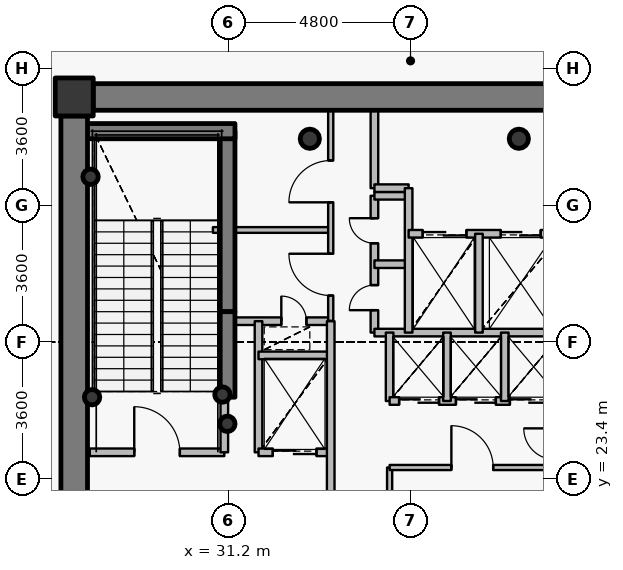
"""IFC4 building model, lengths in metres.
Left out: names, types, materials, properties, quantities, classifications, styles, units other than length and angle.
Written with IfcOpenShell. Run it as: python <this file> out.ifc"""

import sys

from ifc_helpers import new_model, si_unit, direction, frame, frame_2d, origin, origin_2d, place, context, subcontext, project, spatial, rectangle, hollow_circle, extrude, source, transform, mapped, element, fill, save


model = new_model("IFC4")
c1 = context("Model", 3, precision=1e-05, world=origin(), true_north=direction((0.0, 1.0)))
c2 = subcontext(c1, "Body", "Model", "MODEL_VIEW")
j1 = project(units=[si_unit("LENGTHUNIT", "METRE"), si_unit("PLANEANGLEUNIT", "RADIAN")], contexts=[c1])
p1 = place(None, origin())
s1 = spatial("IfcSite", under=j1, at=p1, CompositionType="ELEMENT")
p2 = place(p1, origin())
s2 = spatial("IfcBuilding", under=s1, at=p2, CompositionType="ELEMENT")
p3 = place(p2, frame((0.0, 0.0, 268.2)))
s3 = spatial("IfcBuildingStorey", under=s2, at=p3, CompositionType="ELEMENT", Elevation=268.2)
p4 = place(p3, frame((27.15, 33.45, 0.0), z_axis=(0.0, 0.0, 1.0), x_axis=(1.0, 0.0, 0.0)))
e1 = element("IfcColumn", 1, at=p4, inside=s3, PredefinedType="COLUMN", context=c2, shape_type="SweptSolid", body=[
    extrude(rectangle(XDim=1.0, YDim=1.0, at=origin_2d()), origin(), (0.0, 0.0, 1.0), 4.8),
])
for number, where, z_axis, x_axis in (
    (2, (38.85, 32.35, 0.0), (0.0, 0.0, 1.0), (1.0, 0.0, 0.0)),
    (3, (33.35, 32.35, 0.0), (0.0, 0.0, 1.0), (1.0, 0.0, 0.0)),
):
    element("IfcColumn", number, at=place(p3, frame(where, z_axis=z_axis, x_axis=x_axis)), inside=s3, PredefinedType="COLUMN", context=c2, shape_type="SweptSolid", body=[
        extrude(hollow_circle(Radius=0.254, WallThickness=0.02, at=origin_2d()), origin(), (0.0, 0.0, 1.0), 4.8),
    ])
p5 = place(p3, frame((31.18, 27.8, 0.0), z_axis=(0.0, 0.0, 1.0), x_axis=(0.0, 1.0, 0.0)))
e4 = element("IfcWall", 4, at=p5, inside=s3, PredefinedType="SHEAR", context=c2, shape_type="SweptSolid", body=[
    extrude(rectangle(XDim=4.75, YDim=0.4, at=frame_2d((2.375, 0.0))), origin(), (0.0, 0.0, 1.0), 4.8),
])
p6 = place(p3, frame((27.25, 32.55, 0.0), z_axis=(0.0, 0.0, 1.0), x_axis=(1.0, 0.0, 0.0)))
e5 = element("IfcWall", 5, at=p6, inside=s3, PredefinedType="SHEAR", context=c2, shape_type="SweptSolid", body=[
    extrude(rectangle(XDim=4.13, YDim=0.4, at=frame_2d((2.065, 0.0))), origin(), (0.0, 0.0, 1.0), 4.8),
])
for number, where, z_axis, x_axis in (
    (6, (27.58, 31.35, 0.0), (0.0, 0.0, 1.0), (1.0, 0.0, 0.0)),
    (7, (31.05, 25.62, 0.0), (0.0, 0.0, 1.0), (1.0, 0.0, 0.0)),
    (8, (31.18, 24.85, 0.0), (0.0, 0.0, 1.0), (1.0, 0.0, 0.0)),
    (9, (27.62, 25.55, 0.0), (0.0, 0.0, 1.0), (1.0, 0.0, 0.0)),
):
    element("IfcColumn", number, at=place(p3, frame(where, z_axis=z_axis, x_axis=x_axis)), inside=s3, PredefinedType="COLUMN", context=c2, shape_type="SweptSolid", body=[
        extrude(hollow_circle(Radius=0.203, WallThickness=0.016, at=origin_2d()), origin(), (0.0, 0.0, 1.0), 4.8),
    ])
p7 = place(p3, frame((27.65, 33.45, 0.0), z_axis=(0.0, 0.0, 1.0), x_axis=(1.0, 0.0, 0.0)))
e10 = element("IfcWall", 10, at=p7, inside=s3, PredefinedType="SHEAR", context=c2, shape_type="SweptSolid", body=[
    extrude(rectangle(XDim=16.7, YDim=0.7, at=frame_2d((8.35, 0.0))), origin(), (0.0, 0.0, 1.0), 4.1),
])
p8 = place(p7, frame((12.775, 0.0, 0.0)))
e11 = element("IfcOpeningElement", 11, at=p8, cuts=e10, PredefinedType="OPENING", context=c2, shape_type="SweptSolid", body=[
    extrude(rectangle(XDim=1.15, YDim=2.15, at=origin_2d()), frame((0.575, 0.36, 1.075), z_axis=(0.0, -1.0, 0.0), x_axis=(1.0, 0.0, 0.0)), (0.0, 0.0, 1.0), 0.72),
])
p9 = place(p3, frame((27.15, 21.05, 0.0), z_axis=(0.0, 0.0, 1.0), x_axis=(0.0, 1.0, 0.0)))
e12 = element("IfcWall", 12, at=p9, inside=s3, PredefinedType="SHEAR", context=c2, shape_type="SweptSolid", body=[
    extrude(rectangle(XDim=11.9, YDim=0.7, at=frame_2d((5.95, 0.0))), origin(), (0.0, 0.0, 1.0), 4.1),
])
p10 = place(p3, frame((31.18, 25.55, 0.0), z_axis=(0.0, 0.0, 1.0), x_axis=(0.0, 1.0, 0.0)))
e13 = element("IfcWall", 13, at=p10, inside=s3, PredefinedType="SHEAR", context=c2, shape_type="SweptSolid", body=[
    extrude(rectangle(XDim=2.25, YDim=0.4, at=frame_2d((1.125, 0.0))), origin(), (0.0, 0.0, 1.0), 4.15),
])
p11 = place(p3, frame((27.56, 24.1, 0.0), z_axis=(0.0, 0.0, 1.0), x_axis=(1.0, 0.0, 0.0)))
e14 = element("IfcWall", 14, at=p11, inside=s3, PredefinedType="PARTITIONING", context=c2, shape_type="SweptSolid", body=[
    extrude(rectangle(XDim=3.54, YDim=0.2, at=frame_2d((1.77, 0.0))), origin(), (0.0, 0.0, 1.0), 4.55),
])
p12 = place(p11, frame((1.17, 0.0, 0.0)))
e15 = element("IfcOpeningElement", 15, at=p12, cuts=e14, PredefinedType="OPENING", context=c2, shape_type="SweptSolid", body=[
    extrude(rectangle(XDim=1.2, YDim=2.15, at=origin_2d()), frame((0.6, 0.11, 1.075), z_axis=(0.0, -1.0, 0.0), x_axis=(1.0, 0.0, 0.0)), (0.0, 0.0, 1.0), 0.22),
])
p13 = place(p3, frame((30.8, 29.95, 0.0), z_axis=(0.0, 0.0, 1.0), x_axis=(1.0, 0.0, 0.0)))
e16 = element("IfcWall", 16, at=p13, inside=s3, PredefinedType="PARTITIONING", context=c2, shape_type="SweptSolid", body=[
    extrude(rectangle(XDim=3.1, YDim=0.15, at=frame_2d((1.55, 0.0))), origin(), (0.0, 0.0, 1.0), 4.135),
])
p14 = place(p3, frame((31.1, 24.1, 0.0), z_axis=(0.0, 0.0, 1.0), x_axis=(0.0, 1.0, 0.0)))
e17 = element("IfcWall", 17, at=p14, inside=s3, PredefinedType="PARTITIONING", context=c2, shape_type="SweptSolid", body=[
    extrude(rectangle(XDim=1.44, YDim=0.2, at=frame_2d((0.72, 0.0))), origin(), (0.0, 0.0, 1.0), 4.55),
])
p15 = place(p3, frame((31.1, 27.55, 0.0), z_axis=(0.0, 0.0, 1.0), x_axis=(1.0, 0.0, 0.0)))
e18 = element("IfcWall", 18, at=p15, inside=s3, PredefinedType="PARTITIONING", context=c2, shape_type="SweptSolid", body=[
    extrude(rectangle(XDim=2.8, YDim=0.2, at=frame_2d((1.4, 0.0))), origin(), (0.0, 0.0, 1.0), 4.135),
])
p16 = place(p15, frame((1.5, 0.0, 0.0)))
e19 = element("IfcOpeningElement", 19, at=p16, cuts=e18, PredefinedType="OPENING", context=c2, shape_type="SweptSolid", body=[
    extrude(rectangle(XDim=0.66, YDim=2.05, at=origin_2d()), frame((0.33, 0.11, 1.025), z_axis=(0.0, -1.0, 0.0), x_axis=(1.0, 0.0, 0.0)), (0.0, 0.0, 1.0), 0.22),
])
p17 = place(p3, frame((32.0, 24.1, 0.0), z_axis=(0.0, 0.0, 1.0), x_axis=(0.0, 1.0, 0.0)))
e20 = element("IfcWall", 20, at=p17, inside=s3, PredefinedType="PARTITIONING", context=c2, shape_type="SweptSolid", body=[
    extrude(rectangle(XDim=3.45, YDim=0.2, at=frame_2d((1.725, 0.0))), origin(), (0.0, 0.0, 1.0), 4.55),
])
p18 = place(p3, frame((32.0, 24.1, 0.0), z_axis=(0.0, 0.0, 1.0), x_axis=(1.0, 0.0, 0.0)))
e21 = element("IfcWall", 21, at=p18, inside=s3, PredefinedType="PARTITIONING", context=c2, shape_type="SweptSolid", body=[
    extrude(rectangle(XDim=1.9, YDim=0.2, at=frame_2d((0.95, 0.0))), origin(), (0.0, 0.0, 1.0), 4.135),
])
p19 = place(p18, frame((0.375, 0.0, 0.0)))
e22 = element("IfcOpeningElement", 22, at=p19, cuts=e21, PredefinedType="OPENING", context=c2, shape_type="SweptSolid", body=[
    extrude(rectangle(XDim=1.15, YDim=2.15, at=origin_2d()), frame((0.575, 0.11, 1.075), z_axis=(0.0, -1.0, 0.0), x_axis=(1.0, 0.0, 0.0)), (0.0, 0.0, 1.0), 0.22),
])
p20 = place(p3, frame((32.0, 26.65, 0.0), z_axis=(0.0, 0.0, 1.0), x_axis=(1.0, 0.0, 0.0)))
e23 = element("IfcWall", 23, at=p20, inside=s3, PredefinedType="PARTITIONING", context=c2, shape_type="SweptSolid", body=[
    extrude(rectangle(XDim=1.9, YDim=0.2, at=frame_2d((0.95, 0.0))), origin(), (0.0, 0.0, 1.0), 4.135),
])
p21 = place(p3, frame((33.9, 20.9, 0.0), z_axis=(0.0, 0.0, 1.0), x_axis=(0.0, 1.0, 0.0)))
e24 = element("IfcWall", 24, at=p21, inside=s3, PredefinedType="PARTITIONING", context=c2, shape_type="SweptSolid", body=[
    extrude(rectangle(XDim=6.65, YDim=0.2, at=frame_2d((3.325, 0.0))), origin(), (0.0, 0.0, 1.0), 4.135),
])
p22 = place(p3, frame((33.9, 27.56, 0.0), z_axis=(0.0, 0.0, 1.0), x_axis=(0.0, 1.0, 0.0)))
e25 = element("IfcWall", 25, at=p22, inside=s3, PredefinedType="PARTITIONING", context=c2, shape_type="SweptSolid", body=[
    extrude(rectangle(XDim=5.54, YDim=0.135, at=frame_2d((2.77, 0.0))), origin(), (0.0, 0.0, 1.0), 4.135),
])
p23 = place(p22, frame((0.665, 0.0, 0.0)))
e26 = element("IfcOpeningElement", 26, at=p23, cuts=e25, PredefinedType="OPENING", context=c2, shape_type="SweptSolid", body=[
    extrude(rectangle(XDim=1.1, YDim=2.15, at=origin_2d()), frame((0.55, 0.078, 1.075), z_axis=(0.0, -1.0, 0.0), x_axis=(1.0, 0.0, 0.0)), (0.0, 0.0, 1.0), 0.155),
])
p24 = place(p22, frame((3.117, 0.0, 0.0)))
e27 = element("IfcOpeningElement", 27, at=p24, cuts=e25, PredefinedType="OPENING", context=c2, shape_type="SweptSolid", body=[
    extrude(rectangle(XDim=1.1, YDim=2.15, at=origin_2d()), frame((0.55, 0.078, 1.075), z_axis=(0.0, -1.0, 0.0), x_axis=(1.0, 0.0, 0.0)), (0.0, 0.0, 1.0), 0.155),
])
p25 = place(p3, frame((35.05, 27.25, 0.0), z_axis=(0.0, 0.0, 1.0), x_axis=(0.0, 1.0, 0.0)))
e28 = element("IfcWall", 28, at=p25, inside=s3, PredefinedType="PARTITIONING", context=c2, shape_type="SweptSolid", body=[
    extrude(rectangle(XDim=3.6, YDim=0.2, at=frame_2d((1.8, 0.0))), origin(), (0.0, 0.0, 1.0), 4.55),
])
p26 = place(p25, frame((0.59, 0.0, 0.0)))
e29 = element("IfcOpeningElement", 29, at=p26, cuts=e28, PredefinedType="OPENING", context=c2, shape_type="SweptSolid", body=[
    extrude(rectangle(XDim=0.66, YDim=2.05, at=origin_2d()), frame((0.33, 0.11, 1.025), z_axis=(0.0, -1.0, 0.0), x_axis=(1.0, 0.0, 0.0)), (0.0, 0.0, 1.0), 0.22),
])
p27 = place(p25, frame((2.35, 0.0, 0.0)))
e30 = element("IfcOpeningElement", 30, at=p27, cuts=e28, PredefinedType="OPENING", context=c2, shape_type="SweptSolid", body=[
    extrude(rectangle(XDim=0.66, YDim=2.05, at=origin_2d()), frame((0.33, 0.11, 1.025), z_axis=(0.0, -1.0, 0.0), x_axis=(1.0, 0.0, 0.0)), (0.0, 0.0, 1.0), 0.22),
])
p28 = place(p3, frame((35.05, 27.25, 0.0), z_axis=(0.0, 0.0, 1.0), x_axis=(1.0, 0.0, 0.0)))
e31 = element("IfcWall", 31, at=p28, inside=s3, PredefinedType="PARTITIONING", context=c2, shape_type="SweptSolid", body=[
    extrude(rectangle(XDim=4.95, YDim=0.2, at=frame_2d((2.475, 0.0))), origin(), (0.0, 0.0, 1.0), 4.135),
])
for number, where, z_axis, x_axis in (
    (32, (35.05, 29.05, 0.0), (0.0, 0.0, 1.0), (1.0, 0.0, 0.0)),
    (33, (35.05, 30.85, 0.0), (0.0, 0.0, 1.0), (1.0, 0.0, 0.0)),
):
    element("IfcWall", number, at=place(p3, frame(where, z_axis=z_axis, x_axis=x_axis)), inside=s3, PredefinedType="PARTITIONING", context=c2, shape_type="SweptSolid", body=[
        extrude(rectangle(XDim=0.9, YDim=0.2, at=frame_2d((0.45, 0.0))), origin(), (0.0, 0.0, 1.0), 4.55),
    ])
p29 = place(p3, frame((35.05, 31.05, 0.0), z_axis=(0.0, 0.0, 1.0), x_axis=(0.0, 1.0, 0.0)))
e34 = element("IfcWall", 34, at=p29, inside=s3, PredefinedType="PARTITIONING", context=c2, shape_type="SweptSolid", body=[
    extrude(rectangle(XDim=2.05, YDim=0.2, at=frame_2d((1.025, 0.0))), origin(), (0.0, 0.0, 1.0), 4.135),
])
p30 = place(p3, frame((35.05, 31.05, 0.0), z_axis=(0.0, 0.0, 1.0), x_axis=(1.0, 0.0, 0.0)))
e35 = element("IfcWall", 35, at=p30, inside=s3, PredefinedType="PARTITIONING", context=c2, shape_type="SweptSolid", body=[
    extrude(rectangle(XDim=0.9, YDim=0.2, at=frame_2d((0.45, 0.0))), origin(), (0.0, 0.0, 1.0), 4.55),
])
p31 = place(p3, frame((35.45, 20.9, 0.0), z_axis=(0.0, 0.0, 1.0), x_axis=(0.0, 1.0, 0.0)))
e36 = element("IfcWall", 36, at=p31, inside=s3, PredefinedType="PARTITIONING", context=c2, shape_type="SweptSolid", body=[
    extrude(rectangle(XDim=2.8, YDim=0.135, at=frame_2d((1.4, 0.0))), origin(), (0.0, 0.0, 1.0), 4.135),
])
p32 = place(p3, frame((35.45, 23.7, 0.0), z_axis=(0.0, 0.0, 1.0), x_axis=(1.0, 0.0, 0.0)))
e37 = element("IfcWall", 37, at=p32, inside=s3, PredefinedType="PARTITIONING", context=c2, shape_type="SweptSolid", body=[
    extrude(rectangle(XDim=4.35, YDim=0.135, at=frame_2d((2.175, 0.0))), origin(), (0.0, 0.0, 1.0), 4.135),
])
p33 = place(p32, frame((1.625, 0.0, 0.0)))
e38 = element("IfcOpeningElement", 38, at=p33, cuts=e37, PredefinedType="OPENING", context=c2, shape_type="SweptSolid", body=[
    extrude(rectangle(XDim=1.1, YDim=2.15, at=origin_2d()), frame((0.55, 0.078, 1.075), z_axis=(0.0, -1.0, 0.0), x_axis=(1.0, 0.0, 0.0)), (0.0, 0.0, 1.0), 0.155),
])
p34 = place(p3, frame((35.45, 25.45, 0.0), z_axis=(0.0, 0.0, 1.0), x_axis=(0.0, 1.0, 0.0)))
e39 = element("IfcWall", 39, at=p34, inside=s3, PredefinedType="PARTITIONING", context=c2, shape_type="SweptSolid", body=[
    extrude(rectangle(XDim=1.8, YDim=0.2, at=frame_2d((0.9, 0.0))), origin(), (0.0, 0.0, 1.0), 4.55),
])
p35 = place(p3, frame((35.45, 25.45, 0.0), z_axis=(0.0, 0.0, 1.0), x_axis=(1.0, 0.0, 0.0)))
e40 = element("IfcWall", 40, at=p35, inside=s3, PredefinedType="PARTITIONING", context=c2, shape_type="SweptSolid", body=[
    extrude(rectangle(XDim=4.55, YDim=0.2, at=frame_2d((2.275, 0.0))), origin(), (0.0, 0.0, 1.0), 4.135),
])
p36 = place(p35, frame((0.25, 0.0, 0.0)))
e41 = element("IfcOpeningElement", 41, at=p36, cuts=e40, PredefinedType="OPENING", context=c2, shape_type="SweptSolid", body=[
    extrude(rectangle(XDim=1.05, YDim=2.15, at=origin_2d()), frame((0.525, 0.11, 1.075), z_axis=(0.0, -1.0, 0.0), x_axis=(1.0, 0.0, 0.0)), (0.0, 0.0, 1.0), 0.22),
])
p37 = place(p35, frame((1.745, 0.0, 0.0)))
e42 = element("IfcOpeningElement", 42, at=p37, cuts=e40, PredefinedType="OPENING", context=c2, shape_type="SweptSolid", body=[
    extrude(rectangle(XDim=1.05, YDim=2.15, at=origin_2d()), frame((0.525, 0.11, 1.075), z_axis=(0.0, -1.0, 0.0), x_axis=(1.0, 0.0, 0.0)), (0.0, 0.0, 1.0), 0.22),
])
p38 = place(p35, frame((3.165, 0.0, 0.0)))
e43 = element("IfcOpeningElement", 43, at=p38, cuts=e40, PredefinedType="OPENING", context=c2, shape_type="SweptSolid", body=[
    extrude(rectangle(XDim=1.05, YDim=2.15, at=origin_2d()), frame((0.525, 0.11, 1.075), z_axis=(0.0, -1.0, 0.0), x_axis=(1.0, 0.0, 0.0)), (0.0, 0.0, 1.0), 0.22),
])
p39 = place(p3, frame((35.95, 27.25, 0.0), z_axis=(0.0, 0.0, 1.0), x_axis=(0.0, 1.0, 0.0)))
e44 = element("IfcWall", 44, at=p39, inside=s3, PredefinedType="PARTITIONING", context=c2, shape_type="SweptSolid", body=[
    extrude(rectangle(XDim=3.8, YDim=0.2, at=frame_2d((1.9, 0.0))), origin(), (0.0, 0.0, 1.0), 4.55),
])
p40 = place(p3, frame((35.95, 29.85, 0.0), z_axis=(0.0, 0.0, 1.0), x_axis=(1.0, 0.0, 0.0)))
e45 = element("IfcWall", 45, at=p40, inside=s3, PredefinedType="PARTITIONING", context=c2, shape_type="SweptSolid", body=[
    extrude(rectangle(XDim=8.49, YDim=0.2, at=frame_2d((4.245, 0.0))), origin(), (0.0, 0.0, 1.0), 4.135),
])
p41 = place(p40, frame((6.1, 0.0, 0.0)))
e46 = element("IfcOpeningElement", 46, at=p41, cuts=e45, PredefinedType="OPENING", context=c2, shape_type="SweptSolid", body=[
    extrude(rectangle(XDim=1.2, YDim=2.15, at=origin_2d()), frame((0.6, 0.11, 1.075), z_axis=(0.0, -1.0, 0.0), x_axis=(1.0, 0.0, 0.0)), (0.0, 0.0, 1.0), 0.22),
])
p42 = place(p40, frame((0.37, 0.0, 0.0)))
e47 = element("IfcOpeningElement", 47, at=p42, cuts=e45, PredefinedType="OPENING", context=c2, shape_type="SweptSolid", body=[
    extrude(rectangle(XDim=1.15, YDim=2.15, at=origin_2d()), frame((0.575, 0.11, 1.075), z_axis=(0.0, -1.0, 0.0), x_axis=(1.0, 0.0, 0.0)), (0.0, 0.0, 1.0), 0.22),
])
p43 = place(p40, frame((2.425, 0.0, 0.0)))
e48 = element("IfcOpeningElement", 48, at=p43, cuts=e45, PredefinedType="OPENING", context=c2, shape_type="SweptSolid", body=[
    extrude(rectangle(XDim=1.05, YDim=2.15, at=origin_2d()), frame((0.525, 0.11, 1.075), z_axis=(0.0, -1.0, 0.0), x_axis=(1.0, 0.0, 0.0)), (0.0, 0.0, 1.0), 0.22),
])
p44 = place(p3, frame((36.96, 25.45, 0.0), z_axis=(0.0, 0.0, 1.0), x_axis=(0.0, 1.0, 0.0)))
e49 = element("IfcWall", 49, at=p44, inside=s3, PredefinedType="PARTITIONING", context=c2, shape_type="SweptSolid", body=[
    extrude(rectangle(XDim=1.8, YDim=0.2, at=frame_2d((0.9, 0.0))), origin(), (0.0, 0.0, 1.0), 4.55),
])
p45 = place(p3, frame((37.8, 27.25, 0.0), z_axis=(0.0, 0.0, 1.0), x_axis=(0.0, 1.0, 0.0)))
e50 = element("IfcWall", 50, at=p45, inside=s3, PredefinedType="PARTITIONING", context=c2, shape_type="SweptSolid", body=[
    extrude(rectangle(XDim=2.6, YDim=0.2, at=frame_2d((1.3, 0.0))), origin(), (0.0, 0.0, 1.0), 4.55),
])
p46 = place(p3, frame((38.48, 25.45, 0.0), z_axis=(0.0, 0.0, 1.0), x_axis=(0.0, 1.0, 0.0)))
e51 = element("IfcWall", 51, at=p46, inside=s3, PredefinedType="PARTITIONING", context=c2, shape_type="SweptSolid", body=[
    extrude(rectangle(XDim=1.8, YDim=0.2, at=frame_2d((0.9, 0.0))), origin(), (0.0, 0.0, 1.0), 4.55),
])
p47 = place(p3, frame((27.64, 33.8, 0.0), z_axis=(0.0, 0.0, 1.0), x_axis=(-1.0, 0.0, 0.0)))
e52 = element("IfcWall", 52, at=p47, inside=s3, PredefinedType="PARTITIONING", context=c2, shape_type="SweptSolid", body=[
    extrude(rectangle(XDim=0.84, YDim=0.135, at=frame_2d((0.42, 0.0))), origin(), (0.0, 0.0, 1.0), 4.085),
])
p48 = place(p3, frame((26.8, 33.492, 0.0), z_axis=(0.0, 0.0, 1.0), x_axis=(0.0, -1.0, 0.0)))
e53 = element("IfcWall", 53, at=p48, inside=s3, PredefinedType="PARTITIONING", context=c2, shape_type="SweptSolid", body=[
    extrude(rectangle(XDim=0.532, YDim=0.135, at=frame_2d((0.266, 0.0))), origin(), (0.0, 0.0, 1.0), 4.55),
])
m1 = source(origin(), c2, "Body", "SweptSolid", [
    extrude(rectangle(XDim=1.2, YDim=2.15, at=origin_2d()), frame((0.6, 0.025, 1.075), z_axis=(0.0, -1.0, 0.0), x_axis=(1.0, 0.0, 0.0)), (0.0, 0.0, 1.0), 0.05),
])
p49 = place(p12, origin())
e54 = element("IfcDoor", 54, at=p49, inside=s3, OperationType="SINGLE_SWING_LEFT", PredefinedType="DOOR", context=c2, shape_type="MappedRepresentation", body=[
    mapped(m1, transform((0.0, 0.0, 0.0), x_axis=(1.0, 0.0, 0.0), y_axis=(0.0, 1.0, 0.0), z_axis=(0.0, 0.0, 1.0), scale=1.0)),
])
fill(e15, e54)
m2 = source(origin(), c2, "Body", "SweptSolid", [
    extrude(rectangle(XDim=1.15, YDim=2.15, at=origin_2d()), frame((0.575, 0.025, 1.075), z_axis=(0.0, -1.0, 0.0), x_axis=(1.0, 0.0, 0.0)), (0.0, 0.0, 1.0), 0.05),
])
p50 = place(p42, origin())
e55 = element("IfcDoor", 55, at=p50, inside=s3, OperationType="DOUBLE_DOOR_SLIDING", PredefinedType="USERDEFINED", context=c2, shape_type="MappedRepresentation", body=[
    mapped(m2, transform((0.0, 0.0, 0.0), x_axis=(1.0, 0.0, 0.0), y_axis=(0.0, 1.0, 0.0), z_axis=(0.0, 0.0, 1.0), scale=1.0)),
])
fill(e47, e55)
p51 = place(p19, origin())
e56 = element("IfcDoor", 56, at=p51, inside=s3, OperationType="DOUBLE_DOOR_SLIDING", PredefinedType="USERDEFINED", context=c2, shape_type="MappedRepresentation", body=[
    mapped(m2, transform((0.0, 0.0, 0.0), x_axis=(1.0, 0.0, 0.0), y_axis=(0.0, 1.0, 0.0), z_axis=(0.0, 0.0, 1.0), scale=1.0)),
])
fill(e22, e56)
m3 = source(origin(), c2, "Body", "SweptSolid", [
    extrude(rectangle(XDim=1.05, YDim=2.15, at=origin_2d()), frame((0.525, 0.025, 1.075), z_axis=(0.0, -1.0, 0.0), x_axis=(1.0, 0.0, 0.0)), (0.0, 0.0, 1.0), 0.05),
])
p52 = place(p43, origin())
e57 = element("IfcDoor", 57, at=p52, inside=s3, OperationType="DOUBLE_DOOR_SLIDING", PredefinedType="USERDEFINED", context=c2, shape_type="MappedRepresentation", body=[
    mapped(m3, transform((0.0, 0.0, 0.0), x_axis=(1.0, 0.0, 0.0), y_axis=(0.0, 1.0, 0.0), z_axis=(0.0, 0.0, 1.0), scale=1.0)),
])
fill(e48, e57)
p53 = place(p36, origin())
e58 = element("IfcDoor", 58, at=p53, inside=s3, OperationType="DOUBLE_DOOR_SLIDING", PredefinedType="USERDEFINED", context=c2, shape_type="MappedRepresentation", body=[
    mapped(m3, transform((0.0, 0.0, 0.0), x_axis=(1.0, 0.0, 0.0), y_axis=(0.0, 1.0, 0.0), z_axis=(0.0, 0.0, 1.0), scale=1.0)),
])
fill(e41, e58)
p54 = place(p37, origin())
e59 = element("IfcDoor", 59, at=p54, inside=s3, OperationType="DOUBLE_DOOR_SLIDING", PredefinedType="USERDEFINED", context=c2, shape_type="MappedRepresentation", body=[
    mapped(m3, transform((0.0, 0.0, 0.0), x_axis=(1.0, 0.0, 0.0), y_axis=(0.0, 1.0, 0.0), z_axis=(0.0, 0.0, 1.0), scale=1.0)),
])
fill(e42, e59)
p55 = place(p38, origin())
e60 = element("IfcDoor", 60, at=p55, inside=s3, OperationType="DOUBLE_DOOR_SLIDING", PredefinedType="USERDEFINED", context=c2, shape_type="MappedRepresentation", body=[
    mapped(m3, transform((0.0, 0.0, 0.0), x_axis=(1.0, 0.0, 0.0), y_axis=(0.0, 1.0, 0.0), z_axis=(0.0, 0.0, 1.0), scale=1.0)),
])
fill(e43, e60)
m4 = source(origin(), c2, "Body", "SweptSolid", [
    extrude(rectangle(XDim=0.66, YDim=2.05, at=origin_2d()), frame((0.33, 0.025, 1.025), z_axis=(0.0, -1.0, 0.0), x_axis=(1.0, 0.0, 0.0)), (0.0, 0.0, 1.0), 0.05),
])
p56 = place(p26, origin())
e61 = element("IfcDoor", 61, at=p56, inside=s3, OperationType="SINGLE_SWING_LEFT", PredefinedType="USERDEFINED", context=c2, shape_type="MappedRepresentation", body=[
    mapped(m4, transform((0.0, 0.0, 0.0), x_axis=(1.0, 0.0, 0.0), y_axis=(0.0, 1.0, 0.0), z_axis=(0.0, 0.0, 1.0), scale=1.0)),
])
fill(e29, e61)
p57 = place(p27, origin())
e62 = element("IfcDoor", 62, at=p57, inside=s3, OperationType="SINGLE_SWING_RIGHT", PredefinedType="USERDEFINED", context=c2, shape_type="MappedRepresentation", body=[
    mapped(m4, transform((0.0, 0.0, 0.0), x_axis=(1.0, 0.0, 0.0), y_axis=(0.0, 1.0, 0.0), z_axis=(0.0, 0.0, 1.0), scale=1.0)),
])
fill(e30, e62)
m5 = source(origin(), c2, "Body", "SweptSolid", [
    extrude(rectangle(XDim=1.1, YDim=2.15, at=origin_2d()), frame((0.55, 0.025, 1.075), z_axis=(0.0, -1.0, 0.0), x_axis=(1.0, 0.0, 0.0)), (0.0, 0.0, 1.0), 0.05),
])
p58 = place(p33, origin())
e63 = element("IfcDoor", 63, at=p58, inside=s3, OperationType="SINGLE_SWING_LEFT", PredefinedType="DOOR", context=c2, shape_type="MappedRepresentation", body=[
    mapped(m5, transform((0.0, 0.0, 0.0), x_axis=(1.0, 0.0, 0.0), y_axis=(0.0, 1.0, 0.0), z_axis=(0.0, 0.0, 1.0), scale=1.0)),
])
fill(e38, e63)
p59 = place(p23, origin())
e64 = element("IfcDoor", 64, at=p59, inside=s3, OperationType="SINGLE_SWING_RIGHT", PredefinedType="DOOR", context=c2, shape_type="MappedRepresentation", body=[
    mapped(m5, transform((0.0, 0.0, 0.0), x_axis=(1.0, 0.0, 0.0), y_axis=(0.0, 1.0, 0.0), z_axis=(0.0, 0.0, 1.0), scale=1.0)),
])
fill(e26, e64)
p60 = place(p24, origin())
e65 = element("IfcDoor", 65, at=p60, inside=s3, OperationType="SINGLE_SWING_LEFT", PredefinedType="DOOR", context=c2, shape_type="MappedRepresentation", body=[
    mapped(m5, transform((0.0, 0.0, 0.0), x_axis=(1.0, 0.0, 0.0), y_axis=(0.0, 1.0, 0.0), z_axis=(0.0, 0.0, 1.0), scale=1.0)),
])
fill(e27, e65)
p61 = place(p16, origin())
e66 = element("IfcDoor", 66, at=p61, inside=s3, OperationType="SINGLE_SWING_LEFT", PredefinedType="USERDEFINED", context=c2, shape_type="MappedRepresentation", body=[
    mapped(m4, transform((0.0, 0.0, 0.0), x_axis=(1.0, 0.0, 0.0), y_axis=(0.0, 1.0, 0.0), z_axis=(0.0, 0.0, 1.0), scale=1.0)),
])
fill(e19, e66)
save(model, sys.argv[1])
